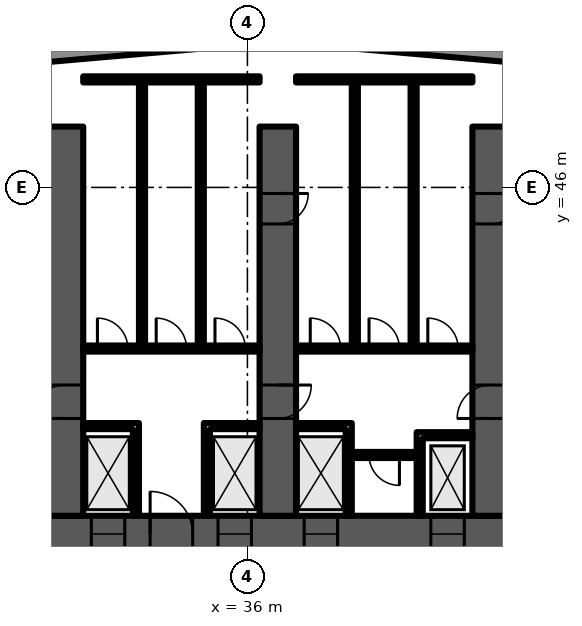
"""IFC4 building model, lengths in metres.
Left out: names, types, materials, properties, quantities, classifications, styles, units other than length and angle.
Written with IfcOpenShell. Run it as: python <this file> out.ifc"""

import sys

from ifc_helpers import new_model, si_unit, direction, frame, frame_2d, origin, place, context, subcontext, project, spatial, polyline, rectangle, outline, extrude, element, fill, save


model = new_model("IFC4")
c1 = context("Model", 3, precision=1e-05, world=origin(), true_north=direction((0.0, 1.0)))
c2 = subcontext(c1, "Body", "Model", "MODEL_VIEW")
j1 = project(units=[si_unit("LENGTHUNIT", "METRE"), si_unit("PLANEANGLEUNIT", "RADIAN")], contexts=[c1])
p1 = place(None, origin())
s1 = spatial("IfcSite", under=j1, at=p1, CompositionType="ELEMENT")
p2 = place(p1, origin())
s2 = spatial("IfcBuilding", under=s1, at=p2, CompositionType="ELEMENT")
p3 = place(p2, origin())
s3 = spatial("IfcBuildingStorey", under=s2, at=p3, CompositionType="ELEMENT", Elevation=0.0)
p4 = place(p3, frame((47.301, 50.11, 0.0), z_axis=(0.0, 0.0, 1.0), x_axis=(-0.996195, 0.087143, 0.0)))
e1 = element("IfcWall", 1, at=p4, inside=s3, PredefinedType="SOLIDWALL", context=c2, shape_type="SweptSolid", body=[
    extrude(rectangle(XDim=10.26, YDim=0.45, at=frame_2d((5.13, 0.0))), origin(), (0.0, 0.0, 1.0), 7.7),
])
p5 = place(p3, frame((36.0, 50.924, 0.0), z_axis=(0.0, 0.0, 1.0), x_axis=(-0.996195, -0.087145, 0.0)))
e2 = element("IfcWall", 2, at=p5, inside=s3, PredefinedType="SOLIDWALL", context=c2, shape_type="SweptSolid", body=[
    extrude(rectangle(XDim=11.344, YDim=0.45, at=frame_2d((5.672, 0.0))), origin(), (0.0, 0.0, 1.0), 7.7),
])
p6 = place(p3, frame((9.0, 34.6, 0.0), z_axis=(0.0, 0.0, 1.0), x_axis=(1.0, 0.0, 0.0)))
e3 = element("IfcWall", 3, at=p6, inside=s3, PredefinedType="SHEAR", context=c2, shape_type="SweptSolid", body=[
    extrude(rectangle(XDim=56.0, YDim=1.2, at=frame_2d((28.0, 0.0))), origin(), (0.0, 0.0, 1.0), 7.7),
])
p7 = place(p6, frame((3.3, 0.0, 0.0)))
e4 = element("IfcOpeningElement", 4, at=p7, cuts=e3, PredefinedType="OPENING", context=c2, shape_type="SweptSolid", body=[
    extrude(rectangle(XDim=1.0, YDim=2.1, at=frame_2d((0.5, 1.05))), frame((0.0, 0.61, 0.0), z_axis=(0.0, -1.0, 0.0), x_axis=(1.0, 0.0, 0.0)), (0.0, 0.0, 1.0), 1.22),
])
p8 = place(p6, frame((7.867, 0.0, 0.0)))
e5 = element("IfcOpeningElement", 5, at=p8, cuts=e3, PredefinedType="OPENING", context=c2, shape_type="SweptSolid", body=[
    extrude(rectangle(XDim=1.1, YDim=2.1, at=frame_2d((0.55, 1.05))), frame((0.0, 0.61, 0.0), z_axis=(0.0, -1.0, 0.0), x_axis=(1.0, 0.0, 0.0)), (0.0, 0.0, 1.0), 1.22),
])
p9 = place(p6, frame((12.033, 0.0, 0.0)))
e6 = element("IfcOpeningElement", 6, at=p9, cuts=e3, PredefinedType="OPENING", context=c2, shape_type="SweptSolid", body=[
    extrude(rectangle(XDim=1.1, YDim=2.1, at=frame_2d((0.55, 1.05))), frame((0.0, 0.61, 0.0), z_axis=(0.0, -1.0, 0.0), x_axis=(1.0, 0.0, 0.0)), (0.0, 0.0, 1.0), 1.22),
])
p10 = place(p6, frame((9.8, 0.0, 0.0)))
e7 = element("IfcOpeningElement", 7, at=p10, cuts=e3, PredefinedType="OPENING", context=c2, shape_type="SweptSolid", body=[
    extrude(rectangle(XDim=1.4, YDim=2.1, at=frame_2d((0.7, 1.05))), frame((0.0, 0.61, 0.0), z_axis=(0.0, -1.0, 0.0), x_axis=(1.0, 0.0, 0.0)), (0.0, 0.0, 1.0), 1.22),
])
p11 = place(p6, frame((14.65, 0.0, 0.0)))
e8 = element("IfcOpeningElement", 8, at=p11, cuts=e3, PredefinedType="OPENING", context=c2, shape_type="SweptSolid", body=[
    extrude(rectangle(XDim=1.2, YDim=2.1, at=frame_2d((0.6, 1.05))), frame((0.0, 0.61, 0.0), z_axis=(0.0, -1.0, 0.0), x_axis=(1.0, 0.0, 0.0)), (0.0, 0.0, 1.0), 1.22),
])
p12 = place(p6, frame((21.867, 0.0, 0.0)))
e9 = element("IfcOpeningElement", 9, at=p12, cuts=e3, PredefinedType="OPENING", context=c2, shape_type="SweptSolid", body=[
    extrude(rectangle(XDim=1.1, YDim=2.1, at=frame_2d((0.55, 1.05))), frame((0.0, 0.61, 0.0), z_axis=(0.0, -1.0, 0.0), x_axis=(1.0, 0.0, 0.0)), (0.0, 0.0, 1.0), 1.22),
])
p13 = place(p6, frame((26.033, 0.0, 0.0)))
e10 = element("IfcOpeningElement", 10, at=p13, cuts=e3, PredefinedType="OPENING", context=c2, shape_type="SweptSolid", body=[
    extrude(rectangle(XDim=1.1, YDim=2.1, at=frame_2d((0.55, 1.05))), frame((0.0, 0.61, 0.0), z_axis=(0.0, -1.0, 0.0), x_axis=(1.0, 0.0, 0.0)), (0.0, 0.0, 1.0), 1.22),
])
p14 = place(p6, frame((23.8, 0.0, 0.0)))
e11 = element("IfcOpeningElement", 11, at=p14, cuts=e3, PredefinedType="OPENING", context=c2, shape_type="SweptSolid", body=[
    extrude(rectangle(XDim=1.4, YDim=2.1, at=frame_2d((0.7, 1.05))), frame((0.0, 0.61, 0.0), z_axis=(0.0, -1.0, 0.0), x_axis=(1.0, 0.0, 0.0)), (0.0, 0.0, 1.0), 1.22),
])
p15 = place(p6, frame((28.867, 0.0, 0.0)))
e12 = element("IfcOpeningElement", 12, at=p15, cuts=e3, PredefinedType="OPENING", context=c2, shape_type="SweptSolid", body=[
    extrude(rectangle(XDim=1.1, YDim=2.1, at=frame_2d((0.55, 1.05))), frame((0.0, 0.61, 0.0), z_axis=(0.0, -1.0, 0.0), x_axis=(1.0, 0.0, 0.0)), (0.0, 0.0, 1.0), 1.22),
])
p16 = place(p6, frame((33.033, 0.0, 0.0)))
e13 = element("IfcOpeningElement", 13, at=p16, cuts=e3, PredefinedType="OPENING", context=c2, shape_type="SweptSolid", body=[
    extrude(rectangle(XDim=1.1, YDim=2.1, at=frame_2d((0.55, 1.05))), frame((0.0, 0.61, 0.0), z_axis=(0.0, -1.0, 0.0), x_axis=(1.0, 0.0, 0.0)), (0.0, 0.0, 1.0), 1.22),
])
p17 = place(p6, frame((40.15, 0.0, 0.0)))
e14 = element("IfcOpeningElement", 14, at=p17, cuts=e3, PredefinedType="OPENING", context=c2, shape_type="SweptSolid", body=[
    extrude(rectangle(XDim=1.2, YDim=2.1, at=frame_2d((0.6, 1.05))), frame((0.0, 0.61, 0.0), z_axis=(0.0, -1.0, 0.0), x_axis=(1.0, 0.0, 0.0)), (0.0, 0.0, 1.0), 1.22),
])
p18 = place(p6, frame((42.867, 0.0, 0.0)))
e15 = element("IfcOpeningElement", 15, at=p18, cuts=e3, PredefinedType="OPENING", context=c2, shape_type="SweptSolid", body=[
    extrude(rectangle(XDim=1.1, YDim=2.1, at=frame_2d((0.55, 1.05))), frame((0.0, 0.61, 0.0), z_axis=(0.0, -1.0, 0.0), x_axis=(1.0, 0.0, 0.0)), (0.0, 0.0, 1.0), 1.22),
])
p19 = place(p6, frame((47.033, 0.0, 0.0)))
e16 = element("IfcOpeningElement", 16, at=p19, cuts=e3, PredefinedType="OPENING", context=c2, shape_type="SweptSolid", body=[
    extrude(rectangle(XDim=1.1, YDim=2.1, at=frame_2d((0.55, 1.05))), frame((0.0, 0.61, 0.0), z_axis=(0.0, -1.0, 0.0), x_axis=(1.0, 0.0, 0.0)), (0.0, 0.0, 1.0), 1.22),
])
p20 = place(p6, frame((44.8, 0.0, 0.0)))
e17 = element("IfcOpeningElement", 17, at=p20, cuts=e3, PredefinedType="OPENING", context=c2, shape_type="SweptSolid", body=[
    extrude(rectangle(XDim=1.4, YDim=2.1, at=frame_2d((0.7, 1.05))), frame((0.0, 0.61, 0.0), z_axis=(0.0, -1.0, 0.0), x_axis=(1.0, 0.0, 0.0)), (0.0, 0.0, 1.0), 1.22),
])
p21 = place(p6, frame((49.867, 0.0, 0.0)))
e18 = element("IfcOpeningElement", 18, at=p21, cuts=e3, PredefinedType="OPENING", context=c2, shape_type="SweptSolid", body=[
    extrude(rectangle(XDim=1.1, YDim=2.1, at=frame_2d((0.55, 1.05))), frame((0.0, 0.61, 0.0), z_axis=(0.0, -1.0, 0.0), x_axis=(1.0, 0.0, 0.0)), (0.0, 0.0, 1.0), 1.22),
])
p22 = place(p6, frame((53.5, 0.0, 0.0)))
e19 = element("IfcOpeningElement", 19, at=p22, cuts=e3, PredefinedType="OPENING", context=c2, shape_type="SweptSolid", body=[
    extrude(rectangle(XDim=1.1, YDim=2.1, at=frame_2d((0.55, 1.05))), frame((0.0, 0.61, 0.0), z_axis=(0.0, -1.0, 0.0), x_axis=(1.0, 0.0, 0.0)), (0.0, 0.0, 1.0), 1.22),
])
p23 = place(p6, frame((51.567, 0.0, 0.0)))
e20 = element("IfcOpeningElement", 20, at=p23, cuts=e3, PredefinedType="OPENING", context=c2, shape_type="SweptSolid", body=[
    extrude(rectangle(XDim=1.4, YDim=2.1, at=frame_2d((0.7, 1.05))), frame((0.0, 0.61, 0.0), z_axis=(0.0, -1.0, 0.0), x_axis=(1.0, 0.0, 0.0)), (0.0, 0.0, 1.0), 1.22),
])
p24 = place(p3, frame((30.0, 35.2, 0.0), z_axis=(0.0, 0.0, 1.0), x_axis=(0.0, 1.0, 0.0)))
e21 = element("IfcWall", 21, at=p24, inside=s3, PredefinedType="SHEAR", context=c2, shape_type="SweptSolid", body=[
    extrude(rectangle(XDim=12.8, YDim=1.2, at=frame_2d((6.4, 0.0))), origin(), (0.0, 0.0, 1.0), 7.7),
])
p25 = place(p24, frame((3.2, 0.0, 0.0)))
e22 = element("IfcOpeningElement", 22, at=p25, cuts=e21, PredefinedType="OPENING", context=c2, shape_type="SweptSolid", body=[
    extrude(rectangle(XDim=1.1, YDim=2.1, at=frame_2d((0.55, 1.05))), frame((0.0, 0.61, 0.0), z_axis=(0.0, -1.0, 0.0), x_axis=(1.0, 0.0, 0.0)), (0.0, 0.0, 1.0), 1.22),
])
p26 = place(p3, frame((37.0, 35.2, 0.0), z_axis=(0.0, 0.0, 1.0), x_axis=(0.0, 1.0, 0.0)))
e23 = element("IfcWall", 23, at=p26, inside=s3, PredefinedType="SHEAR", context=c2, shape_type="SweptSolid", body=[
    extrude(rectangle(XDim=12.8, YDim=1.2, at=frame_2d((6.4, 0.0))), origin(), (0.0, 0.0, 1.0), 7.7),
])
p27 = place(p26, frame((3.2, 0.0, 0.0)))
e24 = element("IfcOpeningElement", 24, at=p27, cuts=e23, PredefinedType="OPENING", context=c2, shape_type="SweptSolid", body=[
    extrude(rectangle(XDim=1.1, YDim=2.1, at=frame_2d((0.55, 1.05))), frame((0.0, 0.61, 0.0), z_axis=(0.0, -1.0, 0.0), x_axis=(1.0, 0.0, 0.0)), (0.0, 0.0, 1.0), 1.22),
])
p28 = place(p26, frame((9.6, 0.0, 0.0)))
e25 = element("IfcOpeningElement", 25, at=p28, cuts=e23, PredefinedType="OPENING", context=c2, shape_type="SweptSolid", body=[
    extrude(rectangle(XDim=1.0, YDim=2.1, at=frame_2d((0.5, 1.05))), frame((0.0, 0.61, 0.0), z_axis=(0.0, -1.0, 0.0), x_axis=(1.0, 0.0, 0.0)), (0.0, 0.0, 1.0), 1.22),
])
p29 = place(p3, frame((44.0, 35.2, 0.0), z_axis=(0.0, 0.0, 1.0), x_axis=(0.0, 1.0, 0.0)))
e26 = element("IfcWall", 26, at=p29, inside=s3, PredefinedType="SHEAR", context=c2, shape_type="SweptSolid", body=[
    extrude(rectangle(XDim=12.8, YDim=1.2, at=frame_2d((6.4, 0.0))), origin(), (0.0, 0.0, 1.0), 7.7),
])
p30 = place(p29, frame((3.2, 0.0, 0.0)))
e27 = element("IfcOpeningElement", 27, at=p30, cuts=e26, PredefinedType="OPENING", context=c2, shape_type="SweptSolid", body=[
    extrude(rectangle(XDim=1.1, YDim=2.1, at=frame_2d((0.55, 1.05))), frame((0.0, 0.61, 0.0), z_axis=(0.0, -1.0, 0.0), x_axis=(1.0, 0.0, 0.0)), (0.0, 0.0, 1.0), 1.22),
])
p31 = place(p29, frame((9.6, 0.0, 0.0)))
e28 = element("IfcOpeningElement", 28, at=p31, cuts=e26, PredefinedType="OPENING", context=c2, shape_type="SweptSolid", body=[
    extrude(rectangle(XDim=1.0, YDim=2.1, at=frame_2d((0.5, 1.05))), frame((0.0, 0.61, 0.0), z_axis=(0.0, -1.0, 0.0), x_axis=(1.0, 0.0, 0.0)), (0.0, 0.0, 1.0), 1.22),
])
p32 = place(p3, frame((30.6, 40.7, 0.0), z_axis=(0.0, 0.0, 1.0), x_axis=(1.0, 0.0, 0.0)))
e29 = element("IfcWall", 29, at=p32, inside=s3, PredefinedType="PARTITIONING", context=c2, shape_type="SweptSolid", body=[
    extrude(rectangle(XDim=5.8, YDim=0.2, at=frame_2d((2.9, 0.0))), origin(), (0.0, 0.0, 1.0), 7.7),
])
p33 = place(p32, frame((0.467, 0.0, 0.0)))
e30 = element("IfcOpeningElement", 30, at=p33, cuts=e29, PredefinedType="OPENING", context=c2, shape_type="SweptSolid", body=[
    extrude(rectangle(XDim=1.0, YDim=2.1, at=frame_2d((0.5, 1.05))), frame((0.0, 0.11, 0.0), z_axis=(0.0, -1.0, 0.0), x_axis=(1.0, 0.0, 0.0)), (0.0, 0.0, 1.0), 0.22),
])
p34 = place(p32, frame((2.4, 0.0, 0.0)))
e31 = element("IfcOpeningElement", 31, at=p34, cuts=e29, PredefinedType="OPENING", context=c2, shape_type="SweptSolid", body=[
    extrude(rectangle(XDim=1.0, YDim=2.1, at=frame_2d((0.5, 1.05))), frame((0.0, 0.11, 0.0), z_axis=(0.0, -1.0, 0.0), x_axis=(1.0, 0.0, 0.0)), (0.0, 0.0, 1.0), 0.22),
])
p35 = place(p32, frame((4.333, 0.0, 0.0)))
e32 = element("IfcOpeningElement", 32, at=p35, cuts=e29, PredefinedType="OPENING", context=c2, shape_type="SweptSolid", body=[
    extrude(rectangle(XDim=1.0, YDim=2.1, at=frame_2d((0.5, 1.05))), frame((0.0, 0.11, 0.0), z_axis=(0.0, -1.0, 0.0), x_axis=(1.0, 0.0, 0.0)), (0.0, 0.0, 1.0), 0.22),
])
p36 = place(p3, frame((0.0, 0.0, -0.0)))
e33 = element("IfcWall", 33, at=p36, inside=s3, PredefinedType="PARTITIONING", context=c2, shape_type="SweptSolid", body=[
    extrude(outline(polyline([(32.233, 38.05), (30.6, 38.05), (30.6, 38.25), (32.233, 38.25), (32.433, 38.25), (32.433, 35.2), (32.233, 35.2), (32.233, 38.05)])), origin(), (0.0, 0.0, 1.0), 7.7),
])
p37 = place(p3, frame((0.0, 0.0, -0.0)))
e34 = element("IfcWall", 34, at=p37, inside=s3, PredefinedType="PARTITIONING", context=c2, shape_type="SweptSolid", body=[
    extrude(outline(polyline([(34.567, 38.25), (34.767, 38.25), (36.4, 38.25), (36.4, 38.05), (34.767, 38.05), (34.767, 35.2), (34.567, 35.2), (34.567, 38.25)])), origin(), (0.0, 0.0, 1.0), 7.7),
])
p38 = place(p3, frame((30.6, 49.552, 0.0), z_axis=(0.0, 0.0, 1.0), x_axis=(1.0, 0.0, 0.0)))
e35 = element("IfcWall", 35, at=p38, inside=s3, PredefinedType="PARTITIONING", context=c2, shape_type="SweptSolid", body=[
    extrude(rectangle(XDim=5.8, YDim=0.2, at=frame_2d((2.9, 0.0))), origin(), (0.0, 0.0, 1.0), 7.7),
])
for number, where, z_axis, x_axis in (
    (36, (32.533, 40.8, 0.0), (0.0, 0.0, 1.0), (0.0, 1.0, 0.0)),
    (37, (34.467, 40.8, 0.0), (0.0, 0.0, 1.0), (0.0, 1.0, 0.0)),
):
    element("IfcWall", number, at=place(p3, frame(where, z_axis=z_axis, x_axis=x_axis)), inside=s3, PredefinedType="PARTITIONING", context=c2, shape_type="SweptSolid", body=[
        extrude(rectangle(XDim=8.653, YDim=0.2, at=frame_2d((4.326, 0.0))), origin(), (0.0, 0.0, 1.0), 7.7),
    ])
p39 = place(p3, frame((39.433, 37.2, 0.0), z_axis=(0.0, 0.0, 1.0), x_axis=(1.0, 0.0, 0.0)))
e38 = element("IfcWall", 38, at=p39, inside=s3, PredefinedType="PARTITIONING", context=c2, shape_type="SweptSolid", body=[
    extrude(rectangle(XDim=2.133, YDim=0.2, at=frame_2d((1.067, 0.0))), origin(), (0.0, 0.0, 1.0), 7.7),
])
p40 = place(p39, frame((0.567, 0.0, 0.0)))
e39 = element("IfcOpeningElement", 39, at=p40, cuts=e38, PredefinedType="OPENING", context=c2, shape_type="SweptSolid", body=[
    extrude(rectangle(XDim=1.0, YDim=2.1, at=frame_2d((0.5, 1.05))), frame((0.0, 0.11, 0.0), z_axis=(0.0, -1.0, 0.0), x_axis=(1.0, 0.0, 0.0)), (0.0, 0.0, 1.0), 0.22),
])
p41 = place(p3, frame((37.6, 40.7, 0.0), z_axis=(0.0, 0.0, 1.0), x_axis=(1.0, 0.0, 0.0)))
e40 = element("IfcWall", 40, at=p41, inside=s3, PredefinedType="PARTITIONING", context=c2, shape_type="SweptSolid", body=[
    extrude(rectangle(XDim=5.8, YDim=0.2, at=frame_2d((2.9, 0.0))), origin(), (0.0, 0.0, 1.0), 7.7),
])
p42 = place(p41, frame((0.467, 0.0, 0.0)))
e41 = element("IfcOpeningElement", 41, at=p42, cuts=e40, PredefinedType="OPENING", context=c2, shape_type="SweptSolid", body=[
    extrude(rectangle(XDim=1.0, YDim=2.1, at=frame_2d((0.5, 1.05))), frame((0.0, 0.11, 0.0), z_axis=(0.0, -1.0, 0.0), x_axis=(1.0, 0.0, 0.0)), (0.0, 0.0, 1.0), 0.22),
])
p43 = place(p41, frame((2.4, 0.0, 0.0)))
e42 = element("IfcOpeningElement", 42, at=p43, cuts=e40, PredefinedType="OPENING", context=c2, shape_type="SweptSolid", body=[
    extrude(rectangle(XDim=1.0, YDim=2.1, at=frame_2d((0.5, 1.05))), frame((0.0, 0.11, 0.0), z_axis=(0.0, -1.0, 0.0), x_axis=(1.0, 0.0, 0.0)), (0.0, 0.0, 1.0), 0.22),
])
p44 = place(p41, frame((4.333, 0.0, 0.0)))
e43 = element("IfcOpeningElement", 43, at=p44, cuts=e40, PredefinedType="OPENING", context=c2, shape_type="SweptSolid", body=[
    extrude(rectangle(XDim=1.0, YDim=2.1, at=frame_2d((0.5, 1.05))), frame((0.0, 0.11, 0.0), z_axis=(0.0, -1.0, 0.0), x_axis=(1.0, 0.0, 0.0)), (0.0, 0.0, 1.0), 0.22),
])
p45 = place(p3, frame((0.0, 0.0, -0.0)))
e44 = element("IfcWall", 44, at=p45, inside=s3, PredefinedType="PARTITIONING", context=c2, shape_type="SweptSolid", body=[
    extrude(outline(polyline([(41.567, 37.95), (41.767, 37.95), (43.4, 37.95), (43.4, 37.75), (41.767, 37.75), (41.767, 35.2), (41.567, 35.2), (41.567, 37.95)])), origin(), (0.0, 0.0, 1.0), 7.7),
])
p46 = place(p3, frame((0.0, 0.0, -0.0)))
e45 = element("IfcWall", 45, at=p46, inside=s3, PredefinedType="PARTITIONING", context=c2, shape_type="SweptSolid", body=[
    extrude(outline(polyline([(39.233, 38.05), (37.6, 38.05), (37.6, 38.25), (39.233, 38.25), (39.433, 38.25), (39.433, 35.2), (39.233, 35.2), (39.233, 38.05)])), origin(), (0.0, 0.0, 1.0), 7.7),
])
p47 = place(p3, frame((37.6, 49.552, 0.0), z_axis=(0.0, 0.0, 1.0), x_axis=(1.0, 0.0, 0.0)))
e46 = element("IfcWall", 46, at=p47, inside=s3, PredefinedType="PARTITIONING", context=c2, shape_type="SweptSolid", body=[
    extrude(rectangle(XDim=5.8, YDim=0.2, at=frame_2d((2.9, 0.0))), origin(), (0.0, 0.0, 1.0), 7.7),
])
for number, where, z_axis, x_axis in (
    (47, (39.533, 40.8, 0.0), (0.0, 0.0, 1.0), (0.0, 1.0, 0.0)),
    (48, (41.467, 40.8, 0.0), (0.0, 0.0, 1.0), (0.0, 1.0, 0.0)),
):
    element("IfcWall", number, at=place(p3, frame(where, z_axis=z_axis, x_axis=x_axis)), inside=s3, PredefinedType="PARTITIONING", context=c2, shape_type="SweptSolid", body=[
        extrude(rectangle(XDim=8.653, YDim=0.2, at=frame_2d((4.326, 0.0))), origin(), (0.0, 0.0, 1.0), 7.7),
    ])
p48 = place(p12, origin())
e49 = element("IfcDoor", 49, at=p48, inside=s3, OperationType="DOUBLE_DOOR_SLIDING", PredefinedType="DOOR", context=c2, shape_type="SweptSolid", body=[
    extrude(rectangle(XDim=1.1, YDim=2.1, at=frame_2d((0.55, 1.05))), frame((0.0, 0.025, 0.0), z_axis=(0.0, -1.0, 0.0), x_axis=(1.0, 0.0, 0.0)), (0.0, 0.0, 1.0), 0.05),
])
fill(e9, e49)
p49 = place(p13, origin())
e50 = element("IfcDoor", 50, at=p49, inside=s3, OperationType="DOUBLE_DOOR_SLIDING", PredefinedType="DOOR", context=c2, shape_type="SweptSolid", body=[
    extrude(rectangle(XDim=1.1, YDim=2.1, at=frame_2d((0.55, 1.05))), frame((0.0, 0.025, 0.0), z_axis=(0.0, -1.0, 0.0), x_axis=(1.0, 0.0, 0.0)), (0.0, 0.0, 1.0), 0.05),
])
fill(e10, e50)
p50 = place(p14, origin())
e51 = element("IfcDoor", 51, at=p50, inside=s3, OperationType="DOUBLE_DOOR_SINGLE_SWING", PredefinedType="DOOR", context=c2, shape_type="SweptSolid", body=[
    extrude(rectangle(XDim=1.4, YDim=2.1, at=frame_2d((0.7, 1.05))), frame((0.0, 0.025, 0.0), z_axis=(0.0, -1.0, 0.0), x_axis=(1.0, 0.0, 0.0)), (0.0, 0.0, 1.0), 0.05),
])
fill(e11, e51)
p51 = place(p33, origin())
e52 = element("IfcDoor", 52, at=p51, inside=s3, OperationType="SINGLE_SWING_LEFT", PredefinedType="DOOR", context=c2, shape_type="SweptSolid", body=[
    extrude(rectangle(XDim=1.0, YDim=2.1, at=frame_2d((0.5, 1.05))), frame((0.0, 0.025, 0.0), z_axis=(0.0, -1.0, 0.0), x_axis=(1.0, 0.0, 0.0)), (0.0, 0.0, 1.0), 0.05),
])
fill(e30, e52)
p52 = place(p34, origin())
e53 = element("IfcDoor", 53, at=p52, inside=s3, OperationType="SINGLE_SWING_LEFT", PredefinedType="DOOR", context=c2, shape_type="SweptSolid", body=[
    extrude(rectangle(XDim=1.0, YDim=2.1, at=frame_2d((0.5, 1.05))), frame((0.0, 0.025, 0.0), z_axis=(0.0, -1.0, 0.0), x_axis=(1.0, 0.0, 0.0)), (0.0, 0.0, 1.0), 0.05),
])
fill(e31, e53)
p53 = place(p35, origin())
e54 = element("IfcDoor", 54, at=p53, inside=s3, OperationType="SINGLE_SWING_LEFT", PredefinedType="DOOR", context=c2, shape_type="SweptSolid", body=[
    extrude(rectangle(XDim=1.0, YDim=2.1, at=frame_2d((0.5, 1.05))), frame((0.0, 0.025, 0.0), z_axis=(0.0, -1.0, 0.0), x_axis=(1.0, 0.0, 0.0)), (0.0, 0.0, 1.0), 0.05),
])
fill(e32, e54)
p54 = place(p40, origin())
e55 = element("IfcDoor", 55, at=p54, inside=s3, OperationType="SINGLE_SWING_RIGHT", PredefinedType="DOOR", context=c2, shape_type="SweptSolid", body=[
    extrude(rectangle(XDim=1.0, YDim=2.1, at=frame_2d((0.5, 1.05))), frame((0.0, 0.025, 0.0), z_axis=(0.0, -1.0, 0.0), x_axis=(1.0, 0.0, 0.0)), (0.0, 0.0, 1.0), 0.05),
])
fill(e39, e55)
p55 = place(p15, origin())
e56 = element("IfcDoor", 56, at=p55, inside=s3, OperationType="DOUBLE_DOOR_SLIDING", PredefinedType="DOOR", context=c2, shape_type="SweptSolid", body=[
    extrude(rectangle(XDim=1.1, YDim=2.1, at=frame_2d((0.55, 1.05))), frame((0.0, 0.025, 0.0), z_axis=(0.0, -1.0, 0.0), x_axis=(1.0, 0.0, 0.0)), (0.0, 0.0, 1.0), 0.05),
])
fill(e12, e56)
p56 = place(p16, origin())
e57 = element("IfcDoor", 57, at=p56, inside=s3, OperationType="DOUBLE_DOOR_SLIDING", PredefinedType="DOOR", context=c2, shape_type="SweptSolid", body=[
    extrude(rectangle(XDim=1.1, YDim=2.1, at=frame_2d((0.55, 1.05))), frame((0.0, 0.025, 0.0), z_axis=(0.0, -1.0, 0.0), x_axis=(1.0, 0.0, 0.0)), (0.0, 0.0, 1.0), 0.05),
])
fill(e13, e57)
p57 = place(p42, origin())
e58 = element("IfcDoor", 58, at=p57, inside=s3, OperationType="SINGLE_SWING_LEFT", PredefinedType="DOOR", context=c2, shape_type="SweptSolid", body=[
    extrude(rectangle(XDim=1.0, YDim=2.1, at=frame_2d((0.5, 1.05))), frame((0.0, 0.025, 0.0), z_axis=(0.0, -1.0, 0.0), x_axis=(1.0, 0.0, 0.0)), (0.0, 0.0, 1.0), 0.05),
])
fill(e41, e58)
p58 = place(p43, origin())
e59 = element("IfcDoor", 59, at=p58, inside=s3, OperationType="SINGLE_SWING_LEFT", PredefinedType="DOOR", context=c2, shape_type="SweptSolid", body=[
    extrude(rectangle(XDim=1.0, YDim=2.1, at=frame_2d((0.5, 1.05))), frame((0.0, 0.025, 0.0), z_axis=(0.0, -1.0, 0.0), x_axis=(1.0, 0.0, 0.0)), (0.0, 0.0, 1.0), 0.05),
])
fill(e42, e59)
p59 = place(p44, origin())
e60 = element("IfcDoor", 60, at=p59, inside=s3, OperationType="SINGLE_SWING_LEFT", PredefinedType="DOOR", context=c2, shape_type="SweptSolid", body=[
    extrude(rectangle(XDim=1.0, YDim=2.1, at=frame_2d((0.5, 1.05))), frame((0.0, 0.025, 0.0), z_axis=(0.0, -1.0, 0.0), x_axis=(1.0, 0.0, 0.0)), (0.0, 0.0, 1.0), 0.05),
])
fill(e43, e60)
p60 = place(p25, origin())
e61 = element("IfcDoor", 61, at=p60, inside=s3, OperationType="SINGLE_SWING_LEFT", PredefinedType="DOOR", context=c2, shape_type="SweptSolid", body=[
    extrude(rectangle(XDim=1.1, YDim=2.1, at=frame_2d((0.55, 1.05))), frame((0.0, 0.025, 0.0), z_axis=(0.0, -1.0, 0.0), x_axis=(1.0, 0.0, 0.0)), (0.0, 0.0, 1.0), 0.05),
])
fill(e22, e61)
p61 = place(p27, origin())
e62 = element("IfcDoor", 62, at=p61, inside=s3, OperationType="SINGLE_SWING_RIGHT", PredefinedType="DOOR", context=c2, shape_type="SweptSolid", body=[
    extrude(rectangle(XDim=1.1, YDim=2.1, at=frame_2d((0.55, 1.05))), frame((0.0, 0.025, 0.0), z_axis=(0.0, -1.0, 0.0), x_axis=(1.0, 0.0, 0.0)), (0.0, 0.0, 1.0), 0.05),
])
fill(e24, e62)
p62 = place(p28, origin())
e63 = element("IfcDoor", 63, at=p62, inside=s3, OperationType="SINGLE_SWING_RIGHT", PredefinedType="DOOR", context=c2, shape_type="SweptSolid", body=[
    extrude(rectangle(XDim=1.0, YDim=2.1, at=frame_2d((0.5, 1.05))), frame((0.0, 0.6, 0.0), z_axis=(0.0, -1.0, 0.0), x_axis=(1.0, 0.0, 0.0)), (0.0, 0.0, 1.0), 1.199),
])
fill(e25, e63)
p63 = place(p30, origin())
e64 = element("IfcDoor", 64, at=p63, inside=s3, OperationType="SINGLE_SWING_LEFT", PredefinedType="DOOR", context=c2, shape_type="SweptSolid", body=[
    extrude(rectangle(XDim=1.1, YDim=2.1, at=frame_2d((0.55, 1.05))), frame((0.0, 0.025, 0.0), z_axis=(0.0, -1.0, 0.0), x_axis=(1.0, 0.0, 0.0)), (0.0, 0.0, 1.0), 0.05),
])
fill(e27, e64)
p64 = place(p31, origin())
e65 = element("IfcDoor", 65, at=p64, inside=s3, OperationType="SINGLE_SWING_RIGHT", PredefinedType="DOOR", context=c2, shape_type="SweptSolid", body=[
    extrude(rectangle(XDim=1.0, YDim=2.1, at=frame_2d((0.5, 1.05))), frame((0.0, 0.6, 0.0), z_axis=(0.0, -1.0, 0.0), x_axis=(1.0, 0.0, 0.0)), (0.0, 0.0, 1.0), 1.199),
])
fill(e28, e65)
save(model, sys.argv[1])
